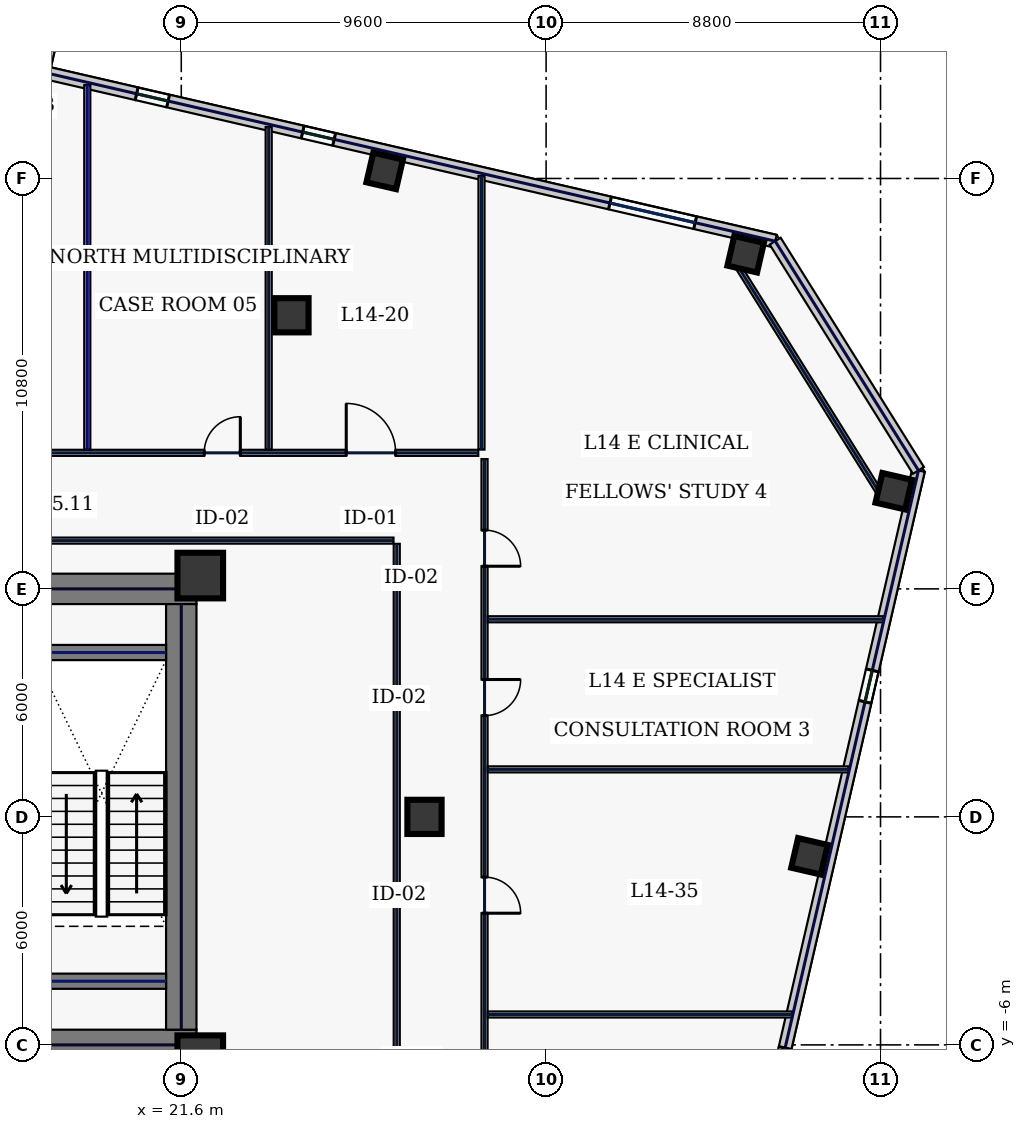
"""IFC4 building model, lengths in metres.
Left out: names, types, materials, properties, quantities, classifications, styles, units other than length and angle.
Written with IfcOpenShell. Run it as: python <this file> out.ifc"""

import sys

from ifc_helpers import new_model, si_unit, direction, frame, frame_2d, origin, origin_2d, place, context, subcontext, project, spatial, rectangle, hollow_rectangle, extrude, element, fill, save


model = new_model("IFC4")
c1 = context("Model", 3, precision=1e-05, world=origin(), true_north=direction((0.0, 1.0)))
c2 = subcontext(c1, "Body", "Model", "MODEL_VIEW")
j1 = project(units=[si_unit("LENGTHUNIT", "METRE"), si_unit("PLANEANGLEUNIT", "RADIAN")], contexts=[c1])
p1 = place(None, origin())
s1 = spatial("IfcSite", under=j1, at=p1, CompositionType="ELEMENT")
p2 = place(p1, origin())
s2 = spatial("IfcBuilding", under=s1, at=p2, CompositionType="ELEMENT")
p3 = place(p2, frame((0.0, 0.0, 67.4)))
s3 = spatial("IfcBuildingStorey", under=s2, at=p3, CompositionType="ELEMENT", Elevation=67.4)
for number, where, z_axis, x_axis in (
    (1, (10.4, 6.0, 0.0), (0.0, 0.0, 1.0), (1.0, 0.0, 0.0)),
    (2, (10.4, -6.0, 0.0), (0.0, 0.0, 1.0), (1.0, 0.0, 0.0)),
):
    element("IfcWall", number, at=place(p3, frame(where, z_axis=z_axis, x_axis=x_axis)), inside=s3, PredefinedType="SHEAR", context=c2, shape_type="SweptSolid", body=[
        extrude(rectangle(XDim=11.6, YDim=0.8, at=frame_2d((5.8, 0.0))), origin(), (0.0, 0.0, 1.0), 3.74),
    ])
p4 = place(p3, frame((21.6, -5.6, 0.0), z_axis=(0.0, 0.0, 1.0), x_axis=(0.0, 1.0, 0.0)))
e3 = element("IfcWall", 3, at=p4, inside=s3, PredefinedType="SHEAR", context=c2, shape_type="SweptSolid", body=[
    extrude(rectangle(XDim=11.2, YDim=0.8, at=frame_2d((5.6, 0.0))), origin(), (0.0, 0.0, 1.0), 3.74),
])
for number, where, z_axis, x_axis in (
    (4, (17.8, -4.325, 0.0), (0.0, 0.0, 1.0), (1.0, 0.0, 0.0)),
    (5, (17.8, 4.325, 0.0), (0.0, 0.0, 1.0), (1.0, 0.0, 0.0)),
):
    element("IfcWall", number, at=place(p3, frame(where, z_axis=z_axis, x_axis=x_axis)), inside=s3, PredefinedType="SHEAR", context=c2, shape_type="SweptSolid", body=[
        extrude(rectangle(XDim=3.4, YDim=0.4, at=frame_2d((1.7, 0.0))), origin(), (0.0, 0.0, 1.0), 3.74),
    ])
for number, where, z_axis, x_axis in (
    (6, (22.1, -6.35, 0.0), (0.0, 0.0, 1.0), (1.0, 0.0, 0.0)),
    (7, (22.1, 6.35, 0.0), (0.0, 0.0, 1.0), (1.0, 0.0, 0.0)),
):
    element("IfcColumn", number, at=place(p3, frame(where, z_axis=z_axis, x_axis=x_axis)), inside=s3, PredefinedType="COLUMN", context=c2, shape_type="SweptSolid", body=[
        extrude(hollow_rectangle(XDim=1.2, YDim=1.2, WallThickness=0.05, at=origin_2d()), origin(), (0.0, 0.0, 1.0), 3.74),
    ])
for number, where, z_axis, x_axis in (
    (8, (24.5, 13.2, 0.0), (0.0, 0.0, 1.0), (1.0, 0.0, 0.0)),
    (9, (28.0, 0.0, 0.0), (0.0, 0.0, 1.0), (1.0, 0.0, 0.0)),
):
    element("IfcColumn", number, at=place(p3, frame(where, z_axis=z_axis, x_axis=x_axis)), inside=s3, PredefinedType="COLUMN", context=c2, shape_type="SweptSolid", body=[
        extrude(hollow_rectangle(XDim=0.9, YDim=0.9, WallThickness=0.04, at=origin_2d()), origin(), (0.0, 0.0, 1.0), 3.74),
    ])
for number, where, z_axis, x_axis in (
    (10, (36.451, 14.806, 0.0), (0.0, 0.0, 1.0), (0.974, -0.225, 0.0)),
    (11, (26.952, 16.999, 0.0), (0.0, 0.0, 1.0), (0.974, -0.225, 0.0)),
    (12, (38.13, -1.038, 0.0), (0.0, 0.0, 1.0), (0.974, -0.225, 0.0)),
    (13, (40.348, 8.57, 0.0), (0.0, 0.0, 1.0), (0.974, -0.225, 0.0)),
):
    element("IfcColumn", number, at=place(p3, frame(where, z_axis=z_axis, x_axis=x_axis)), inside=s3, PredefinedType="COLUMN", context=c2, shape_type="SweptSolid", body=[
        extrude(hollow_rectangle(XDim=0.8, YDim=0.8, WallThickness=0.036, at=origin_2d()), origin(), (0.0, 0.0, 1.0), 3.74),
    ])
p5 = place(p3, frame((37.229, 15.15, 0.0), z_axis=(0.0, 0.0, 1.0), x_axis=(-0.974368689865, 0.224957009695, 0.0)))
e14 = element("IfcWall", 14, at=p5, inside=s3, PredefinedType="STANDARD", context=c2, shape_type="SweptSolid", body=[
    extrude(rectangle(XDim=19.75, YDim=0.34, at=frame_2d((9.875, 0.0))), origin(), (0.0, 0.0, 1.0), 3.74),
])
p6 = place(p5, frame((16.395, 0.0, 0.77)))
e15 = element("IfcOpeningElement", 15, at=p6, cuts=e14, PredefinedType="OPENING", context=c2, shape_type="SweptSolid", body=[
    extrude(rectangle(XDim=0.85, YDim=1.85, at=frame_2d((0.425, 0.925))), frame((0.0, 0.18, 0.0), z_axis=(0.0, -1.0, 0.0), x_axis=(1.0, 0.0, 0.0)), (0.0, 0.0, 1.0), 0.36),
])
p7 = place(p5, frame((11.911, 0.0, 0.77)))
e16 = element("IfcOpeningElement", 16, at=p7, cuts=e14, PredefinedType="OPENING", context=c2, shape_type="SweptSolid", body=[
    extrude(rectangle(XDim=0.85, YDim=1.85, at=frame_2d((0.425, 0.925))), frame((0.0, 0.18, 0.0), z_axis=(0.0, -1.0, 0.0), x_axis=(1.0, 0.0, 0.0)), (0.0, 0.0, 1.0), 0.36),
])
p8 = place(p5, frame((2.162, 0.0, 0.77)))
e17 = element("IfcOpeningElement", 17, at=p8, cuts=e14, PredefinedType="OPENING", context=c2, shape_type="SweptSolid", body=[
    extrude(rectangle(XDim=2.3, YDim=2.1, at=frame_2d((1.15, 1.05))), frame((0.0, 0.18, 0.0), z_axis=(0.0, -1.0, 0.0), x_axis=(1.0, 0.0, 0.0)), (0.0, 0.0, 1.0), 0.36),
])
p9 = place(p3, frame((31.82, -30.637, 0.0), z_axis=(0.0, 0.0, 1.0), x_axis=(0.224949969076, 0.974370315338, 0.0)))
e18 = element("IfcWall", 18, at=p9, inside=s3, PredefinedType="STANDARD", context=c2, shape_type="SweptSolid", body=[
    extrude(rectangle(XDim=40.8, YDim=0.34, at=frame_2d((20.4, 0.0))), origin(), (0.0, 0.0, 1.0), 3.74),
])
p10 = place(p9, frame((4.3, 0.0, 0.58)))
e19 = element("IfcOpeningElement", 19, at=p10, cuts=e18, PredefinedType="OPENING", context=c2, shape_type="SweptSolid", body=[
    extrude(rectangle(XDim=1.6, YDim=2.3, at=frame_2d((0.8, 1.15))), frame((0.0, 0.18, 0.0), z_axis=(0.0, -1.0, 0.0), x_axis=(1.0, 0.0, 0.0)), (0.0, 0.0, 1.0), 0.36),
])
p11 = place(p9, frame((14.5, 0.0, 0.58)))
e20 = element("IfcOpeningElement", 20, at=p11, cuts=e18, PredefinedType="OPENING", context=c2, shape_type="SweptSolid", body=[
    extrude(rectangle(XDim=1.6, YDim=2.3, at=frame_2d((0.8, 1.15))), frame((0.0, 0.18, 0.0), z_axis=(0.0, -1.0, 0.0), x_axis=(1.0, 0.0, 0.0)), (0.0, 0.0, 1.0), 0.36),
])
p12 = place(p9, frame((24.35, 0.0, 0.75)))
e21 = element("IfcOpeningElement", 21, at=p12, cuts=e18, PredefinedType="OPENING", context=c2, shape_type="SweptSolid", body=[
    extrude(rectangle(XDim=0.85, YDim=1.85, at=frame_2d((0.425, 0.925))), frame((0.0, 0.18, 0.0), z_axis=(0.0, -1.0, 0.0), x_axis=(1.0, 0.0, 0.0)), (0.0, 0.0, 1.0), 0.36),
])
p13 = place(p9, frame((34.55, 0.0, 0.75)))
e22 = element("IfcOpeningElement", 22, at=p13, cuts=e18, PredefinedType="OPENING", context=c2, shape_type="SweptSolid", body=[
    extrude(rectangle(XDim=0.85, YDim=1.85, at=frame_2d((0.425, 0.925))), frame((0.0, 0.18, 0.0), z_axis=(0.0, -1.0, 0.0), x_axis=(1.0, 0.0, 0.0)), (0.0, 0.0, 1.0), 0.36),
])
p14 = place(p3, frame((40.998, 9.117, 0.0), z_axis=(0.0, 0.0, 1.0), x_axis=(-0.529921811158, 0.848046504656, 0.0)))
e23 = element("IfcWall", 23, at=p14, inside=s3, PredefinedType="STANDARD", context=c2, shape_type="SweptSolid", body=[
    extrude(rectangle(XDim=7.113, YDim=0.34, at=frame_2d((3.557, 0.0))), origin(), (0.0, 0.0, 1.0), 3.74),
])
p15 = place(p3, frame((17.985, 19.593, 0.0), z_axis=(0.0, 0.0, 1.0), x_axis=(0.224921635065, 0.974376856293, 0.0)))
e24 = element("IfcWall", 24, at=p15, inside=s3, PredefinedType="STANDARD", context=c2, shape_type="SweptSolid", body=[
    extrude(rectangle(XDim=2.87, YDim=0.3, at=frame_2d((1.435, 0.0))), origin(), (0.0, 0.0, 1.0), 3.74),
])
p16 = place(p3, frame((40.06, 8.389, 0.0), z_axis=(0.0, 0.0, 1.0), x_axis=(-0.529927317139, 0.848043064089, 0.0)))
e25 = element("IfcWall", 25, at=p16, inside=s3, PredefinedType="PARTITIONING", context=c2, shape_type="SweptSolid", body=[
    extrude(rectangle(XDim=7.354, YDim=0.16, at=frame_2d((3.677, 0.0))), origin(), (0.0, 0.0, 1.0), 3.74),
])
p17 = place(p3, frame((16.765, 9.58, 0.0), z_axis=(0.0, 0.0, 1.0), x_axis=(1.0, 0.0, 0.0)))
e26 = element("IfcWall", 26, at=p17, inside=s3, PredefinedType="PARTITIONING", context=c2, shape_type="SweptSolid", body=[
    extrude(rectangle(XDim=12.65, YDim=0.16, at=frame_2d((6.325, 0.0))), origin(), (0.0, 0.0, 1.0), 3.74),
])
p18 = place(p17, frame((5.438, 0.0, 0.0)))
e27 = element("IfcOpeningElement", 27, at=p18, cuts=e26, PredefinedType="OPENING", context=c2, shape_type="SweptSolid", body=[
    extrude(rectangle(XDim=0.95, YDim=2.2, at=frame_2d((0.475, 1.1))), frame((0.0, 0.09, 0.0), z_axis=(0.0, -1.0, 0.0), x_axis=(1.0, 0.0, 0.0)), (0.0, 0.0, 1.0), 0.18),
])
p19 = place(p17, frame((9.176, 0.0, 0.0)))
e28 = element("IfcOpeningElement", 28, at=p19, cuts=e26, PredefinedType="OPENING", context=c2, shape_type="SweptSolid", body=[
    extrude(rectangle(XDim=1.3, YDim=2.2, at=frame_2d((0.65, 1.1))), frame((0.0, 0.09, 0.0), z_axis=(0.0, -1.0, 0.0), x_axis=(1.0, 0.0, 0.0)), (0.0, 0.0, 1.0), 0.18),
])
p20 = place(p3, frame((29.58, 9.415, 0.0), z_axis=(0.0, 0.0, 1.0), x_axis=(0.0, -1.0, 0.0)))
e29 = element("IfcWall", 29, at=p20, inside=s3, PredefinedType="PARTITIONING", context=c2, shape_type="SweptSolid", body=[
    extrude(rectangle(XDim=18.63, YDim=0.16, at=frame_2d((9.315, 0.0))), origin(), (0.0, 0.0, 1.0), 3.74),
])
p21 = place(p20, frame((16.081, 0.0, 0.0)))
e30 = element("IfcOpeningElement", 30, at=p21, cuts=e29, PredefinedType="OPENING", context=c2, shape_type="SweptSolid", body=[
    extrude(rectangle(XDim=0.95, YDim=2.2, at=frame_2d((0.475, 1.1))), frame((0.0, 0.09, 0.0), z_axis=(0.0, -1.0, 0.0), x_axis=(1.0, 0.0, 0.0)), (0.0, 0.0, 1.0), 0.18),
])
p22 = place(p20, frame((11.0, 0.0, 0.0)))
e31 = element("IfcOpeningElement", 31, at=p22, cuts=e29, PredefinedType="OPENING", context=c2, shape_type="SweptSolid", body=[
    extrude(rectangle(XDim=0.95, YDim=2.2, at=frame_2d((0.475, 1.1))), frame((0.0, 0.09, 0.0), z_axis=(0.0, -1.0, 0.0), x_axis=(1.0, 0.0, 0.0)), (0.0, 0.0, 1.0), 0.18),
])
p23 = place(p20, frame((5.8, 0.0, 0.0)))
e32 = element("IfcOpeningElement", 32, at=p23, cuts=e29, PredefinedType="OPENING", context=c2, shape_type="SweptSolid", body=[
    extrude(rectangle(XDim=0.95, YDim=2.2, at=frame_2d((0.475, 1.1))), frame((0.0, 0.09, 0.0), z_axis=(0.0, -1.0, 0.0), x_axis=(1.0, 0.0, 0.0)), (0.0, 0.0, 1.0), 0.18),
])
p24 = place(p20, frame((1.869, 0.0, 0.0)))
e33 = element("IfcOpeningElement", 33, at=p24, cuts=e29, PredefinedType="OPENING", context=c2, shape_type="SweptSolid", body=[
    extrude(rectangle(XDim=0.95, YDim=2.2, at=frame_2d((0.475, 1.1))), frame((0.0, 0.09, 0.0), z_axis=(0.0, -1.0, 0.0), x_axis=(1.0, 0.0, 0.0)), (0.0, 0.0, 1.0), 0.18),
])
p25 = place(p3, frame((27.185, 7.27, 0.0), z_axis=(0.0, 0.0, 1.0), x_axis=(-1.0, 0.0, 0.0)))
e34 = element("IfcWall", 34, at=p25, inside=s3, PredefinedType="PARTITIONING", context=c2, shape_type="SweptSolid", body=[
    extrude(rectangle(XDim=16.52, YDim=0.16, at=frame_2d((8.26, 0.0))), origin(), (0.0, 0.0, 1.0), 3.74),
])
p26 = place(p3, frame((27.27, -6.985, 0.0), z_axis=(0.0, 0.0, 1.0), x_axis=(0.0, 1.0, 0.0)))
e35 = element("IfcWall", 35, at=p26, inside=s3, PredefinedType="PARTITIONING", context=c2, shape_type="SweptSolid", body=[
    extrude(rectangle(XDim=14.17, YDim=0.16, at=frame_2d((7.085, 0.0))), origin(), (0.0, 0.0, 1.0), 3.74),
])
p27 = place(p3, frame((29.5, 9.665, 0.0), z_axis=(0.0, 0.0, 1.0), x_axis=(0.0, 1.0, 0.0)))
e36 = element("IfcWall", 36, at=p27, inside=s3, PredefinedType="PARTITIONING", context=c2, shape_type="SweptSolid", body=[
    extrude(rectangle(XDim=7.197, YDim=0.16, at=frame_2d((3.599, 0.0))), origin(), (0.0, 0.0, 1.0), 3.74),
])
p28 = place(p3, frame((19.127, 9.665, 0.0), z_axis=(0.0, 0.0, 1.0), x_axis=(0.0, 1.0, 0.0)))
e37 = element("IfcWall", 37, at=p28, inside=s3, PredefinedType="PARTITIONING", context=c2, shape_type="SweptSolid", body=[
    extrude(rectangle(XDim=9.592, YDim=0.16, at=frame_2d((4.796, 0.0))), origin(), (0.0, 0.0, 1.0), 1.535),
])
p29 = place(p3, frame((23.9, 9.665, 0.0), z_axis=(0.0, 0.0, 1.0), x_axis=(0.0, 1.0, 0.0)))
e38 = element("IfcWall", 38, at=p29, inside=s3, PredefinedType="PARTITIONING", context=c2, shape_type="SweptSolid", body=[
    extrude(rectangle(XDim=8.49, YDim=0.16, at=frame_2d((4.245, 0.0))), origin(), (0.0, 0.0, 1.0), 3.74),
])
p30 = place(p3, frame((29.665, -5.2, 0.0), z_axis=(0.0, 0.0, 1.0), x_axis=(1.0, 0.0, 0.0)))
e39 = element("IfcWall", 39, at=p30, inside=s3, PredefinedType="PARTITIONING", context=c2, shape_type="SweptSolid", body=[
    extrude(rectangle(XDim=8.007, YDim=0.16, at=frame_2d((4.003, 0.0))), origin(), (0.0, 0.0, 1.0), 3.74),
])
p31 = place(p3, frame((29.665, 1.25, 0.0), z_axis=(0.0, 0.0, 1.0), x_axis=(1.0, 0.0, 0.0)))
e40 = element("IfcWall", 40, at=p31, inside=s3, PredefinedType="PARTITIONING", context=c2, shape_type="SweptSolid", body=[
    extrude(rectangle(XDim=9.496, YDim=0.16, at=frame_2d((4.748, 0.0))), origin(), (0.0, 0.0, 1.0), 3.74),
])
p32 = place(p3, frame((29.665, 5.2, 0.0), z_axis=(0.0, 0.0, 1.0), x_axis=(1.0, 0.0, 0.0)))
e41 = element("IfcWall", 41, at=p32, inside=s3, PredefinedType="PARTITIONING", context=c2, shape_type="SweptSolid", body=[
    extrude(rectangle(XDim=10.408, YDim=0.16, at=frame_2d((5.204, 0.0))), origin(), (0.0, 0.0, 1.0), 3.74),
])
p33 = place(p6, origin())
e42 = element("IfcWindow", 42, at=p33, inside=s3, PartitioningType="SINGLE_PANEL", PredefinedType="WINDOW", context=c2, shape_type="SweptSolid", body=[
    extrude(rectangle(XDim=0.85, YDim=1.85, at=frame_2d((0.425, 0.925))), frame((0.0, 0.03, 0.0), z_axis=(0.0, -1.0, 0.0), x_axis=(1.0, 0.0, 0.0)), (0.0, 0.0, 1.0), 0.06),
])
fill(e15, e42)
p34 = place(p7, origin())
e43 = element("IfcWindow", 43, at=p34, inside=s3, PartitioningType="SINGLE_PANEL", PredefinedType="WINDOW", context=c2, shape_type="SweptSolid", body=[
    extrude(rectangle(XDim=0.85, YDim=1.85, at=frame_2d((0.425, 0.925))), frame((0.0, 0.03, 0.0), z_axis=(0.0, -1.0, 0.0), x_axis=(1.0, 0.0, 0.0)), (0.0, 0.0, 1.0), 0.06),
])
fill(e16, e43)
p35 = place(p8, origin())
e44 = element("IfcWindow", 44, at=p35, inside=s3, PartitioningType="SINGLE_PANEL", PredefinedType="WINDOW", context=c2, shape_type="SweptSolid", body=[
    extrude(rectangle(XDim=2.3, YDim=2.1, at=frame_2d((1.15, 1.05))), frame((0.0, 0.03, 0.0), z_axis=(0.0, -1.0, 0.0), x_axis=(1.0, 0.0, 0.0)), (0.0, 0.0, 1.0), 0.06),
])
fill(e17, e44)
p36 = place(p12, origin())
e45 = element("IfcWindow", 45, at=p36, inside=s3, PartitioningType="SINGLE_PANEL", PredefinedType="WINDOW", context=c2, shape_type="SweptSolid", body=[
    extrude(rectangle(XDim=0.85, YDim=1.85, at=frame_2d((0.425, 0.925))), frame((0.0, 0.03, 0.0), z_axis=(0.0, -1.0, 0.0), x_axis=(1.0, 0.0, 0.0)), (0.0, 0.0, 1.0), 0.06),
])
fill(e21, e45)
p37 = place(p13, origin())
e46 = element("IfcWindow", 46, at=p37, inside=s3, PartitioningType="SINGLE_PANEL", PredefinedType="WINDOW", context=c2, shape_type="SweptSolid", body=[
    extrude(rectangle(XDim=0.85, YDim=1.85, at=frame_2d((0.425, 0.925))), frame((0.0, 0.03, 0.0), z_axis=(0.0, -1.0, 0.0), x_axis=(1.0, 0.0, 0.0)), (0.0, 0.0, 1.0), 0.06),
])
fill(e22, e46)
p38 = place(p18, origin())
e47 = element("IfcDoor", 47, at=p38, inside=s3, OperationType="SINGLE_SWING_RIGHT", PredefinedType="DOOR", context=c2, shape_type="SweptSolid", body=[
    extrude(rectangle(XDim=0.95, YDim=2.2, at=frame_2d((0.475, 1.1))), frame((0.0, 0.025, 0.0), z_axis=(0.0, -1.0, 0.0), x_axis=(1.0, 0.0, 0.0)), (0.0, 0.0, 1.0), 0.05),
])
fill(e27, e47)
p39 = place(p19, origin())
e48 = element("IfcDoor", 48, at=p39, inside=s3, OperationType="SINGLE_SWING_LEFT", PredefinedType="DOOR", context=c2, shape_type="SweptSolid", body=[
    extrude(rectangle(XDim=1.3, YDim=2.2, at=frame_2d((0.65, 1.1))), frame((0.0, 0.025, 0.0), z_axis=(0.0, -1.0, 0.0), x_axis=(1.0, 0.0, 0.0)), (0.0, 0.0, 1.0), 0.05),
])
fill(e28, e48)
p40 = place(p22, origin())
e49 = element("IfcDoor", 49, at=p40, inside=s3, OperationType="SINGLE_SWING_RIGHT", PredefinedType="DOOR", context=c2, shape_type="SweptSolid", body=[
    extrude(rectangle(XDim=0.95, YDim=2.2, at=frame_2d((0.475, 1.1))), frame((0.0, 0.025, 0.0), z_axis=(0.0, -1.0, 0.0), x_axis=(1.0, 0.0, 0.0)), (0.0, 0.0, 1.0), 0.05),
])
fill(e31, e49)
p41 = place(p23, origin())
e50 = element("IfcDoor", 50, at=p41, inside=s3, OperationType="SINGLE_SWING_LEFT", PredefinedType="DOOR", context=c2, shape_type="SweptSolid", body=[
    extrude(rectangle(XDim=0.95, YDim=2.2, at=frame_2d((0.475, 1.1))), frame((0.0, 0.025, 0.0), z_axis=(0.0, -1.0, 0.0), x_axis=(1.0, 0.0, 0.0)), (0.0, 0.0, 1.0), 0.05),
])
fill(e32, e50)
p42 = place(p24, origin())
e51 = element("IfcDoor", 51, at=p42, inside=s3, OperationType="SINGLE_SWING_RIGHT", PredefinedType="DOOR", context=c2, shape_type="SweptSolid", body=[
    extrude(rectangle(XDim=0.95, YDim=2.2, at=frame_2d((0.475, 1.1))), frame((0.0, 0.025, 0.0), z_axis=(0.0, -1.0, 0.0), x_axis=(1.0, 0.0, 0.0)), (0.0, 0.0, 1.0), 0.05),
])
fill(e33, e51)
save(model, sys.argv[1])
